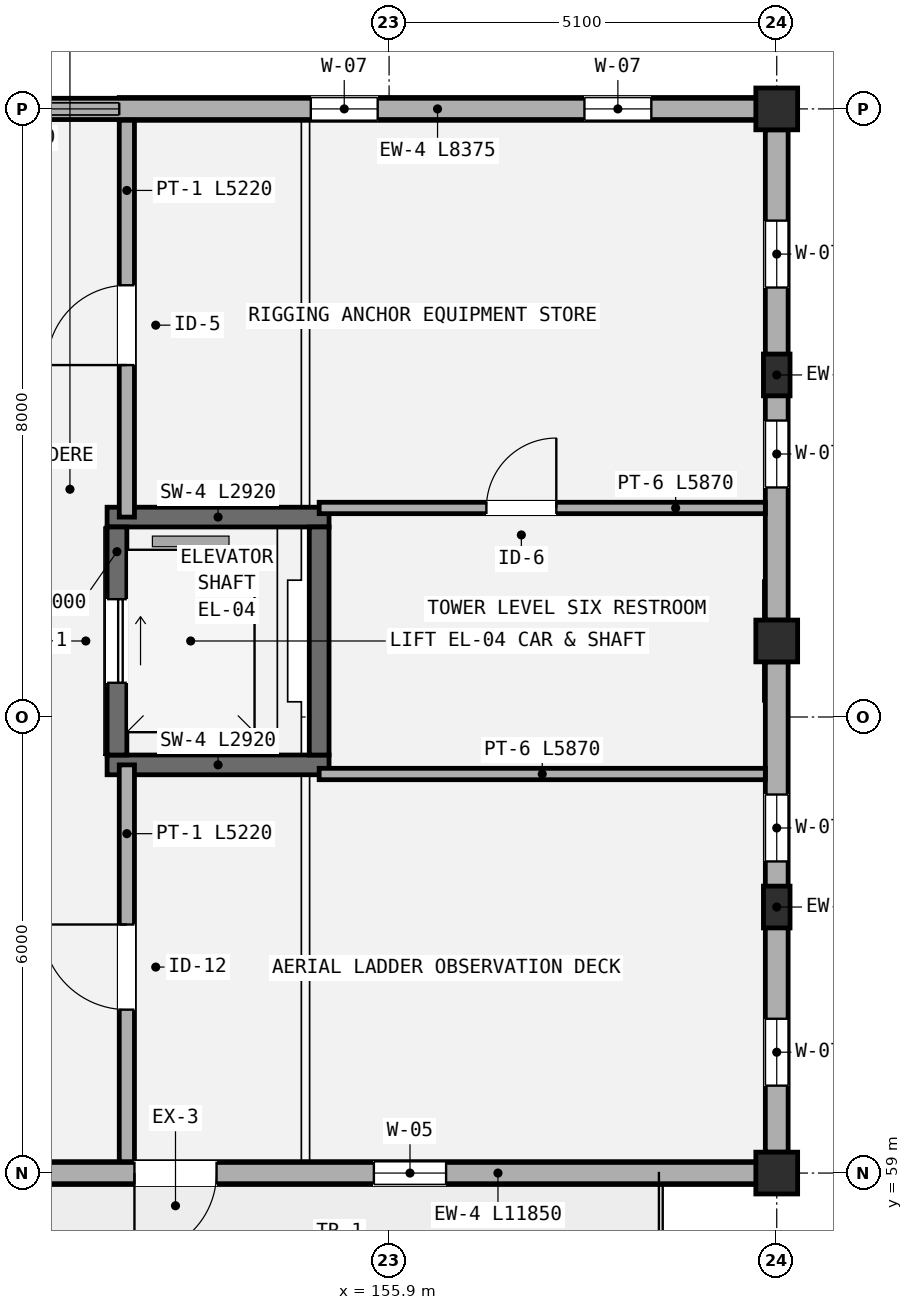
"""IFC4 building model, lengths in metres.
Left out: names, types, materials, properties, quantities, classifications, styles, units other than length and angle.
Written with IfcOpenShell. Run it as: python <this file> out.ifc"""

import sys

from ifc_helpers import new_model, si_unit, direction, frame, frame_2d, origin, origin_2d, place, context, subcontext, project, spatial, polyline, rectangle, outline, extrude, element, fill, save


model = new_model("IFC4")
c1 = context("Model", 3, precision=1e-05, world=origin(), true_north=direction((0.0, 1.0)))
c2 = subcontext(c1, "Body", "Model", "MODEL_VIEW")
j1 = project(units=[si_unit("LENGTHUNIT", "METRE"), si_unit("PLANEANGLEUNIT", "RADIAN")], contexts=[c1])
p1 = place(None, origin())
s1 = spatial("IfcSite", under=j1, at=p1, CompositionType="ELEMENT")
p2 = place(p1, origin())
s2 = spatial("IfcBuilding", under=s1, at=p2, CompositionType="ELEMENT")
p3 = place(p2, frame((0.0, 0.0, 22.05)))
s3 = spatial("IfcBuildingStorey", under=s2, at=p3, CompositionType="ELEMENT", Elevation=22.05)
for number, where, z_axis, x_axis in (
    (1, (161.0, 59.0, 0.0), (0.0, 0.0, 1.0), (1.0, 0.0, 0.0)),
    (2, (161.0, 66.0, 0.0), (0.0, 0.0, 1.0), (1.0, 0.0, 0.0)),
    (3, (161.0, 73.0, 0.0), (0.0, 0.0, 1.0), (1.0, 0.0, 0.0)),
):
    element("IfcColumn", number, at=place(p3, frame(where, z_axis=z_axis, x_axis=x_axis)), inside=s3, PredefinedType="COLUMN", context=c2, shape_type="SweptSolid", body=[
        extrude(rectangle(XDim=0.55, YDim=0.55, at=origin_2d()), origin(), (0.0, 0.0, 1.0), 4.05),
    ])
for number, where, z_axis, x_axis in (
    (4, (161.0, 62.5, 0.0), (0.0, 0.0, 1.0), (1.0, 0.0, 0.0)),
    (5, (161.0, 69.5, 0.0), (0.0, 0.0, 1.0), (1.0, 0.0, 0.0)),
):
    element("IfcColumn", number, at=place(p3, frame(where, z_axis=z_axis, x_axis=x_axis)), inside=s3, PredefinedType="PILASTER", context=c2, shape_type="SweptSolid", body=[
        extrude(rectangle(XDim=0.35, YDim=0.55, at=origin_2d()), origin(), (0.0, 0.0, 1.0), 4.05),
    ])
p4 = place(p3, frame((148.875, 59.0, 0.0), z_axis=(0.0, 0.0, 1.0), x_axis=(1.0, 0.0, 0.0)))
e6 = element("IfcWall", 6, at=p4, inside=s3, PredefinedType="STANDARD", context=c2, shape_type="SweptSolid", body=[
    extrude(rectangle(XDim=11.85, YDim=0.3, at=frame_2d((5.925, 0.0))), origin(), (0.0, 0.0, 1.0), 3.35),
])
p5 = place(p4, frame((3.675, 0.0, 0.0)))
e7 = element("IfcOpeningElement", 7, at=p5, cuts=e6, PredefinedType="OPENING", context=c2, shape_type="SweptSolid", body=[
    extrude(rectangle(XDim=1.08, YDim=2.1, at=frame_2d((0.54, 1.05))), frame((0.0, 0.16, 0.0), z_axis=(0.0, -1.0, 0.0), x_axis=(1.0, 0.0, 0.0)), (0.0, 0.0, 1.0), 0.32),
])
p6 = place(p4, frame((1.225, 0.0, 0.75)))
e8 = element("IfcOpeningElement", 8, at=p6, cuts=e6, PredefinedType="OPENING", context=c2, shape_type="SweptSolid", body=[
    extrude(rectangle(XDim=0.95, YDim=1.35, at=frame_2d((0.475, 0.675))), frame((0.0, 0.16, 0.0), z_axis=(0.0, -1.0, 0.0), x_axis=(1.0, 0.0, 0.0)), (0.0, 0.0, 1.0), 0.32),
])
p7 = place(p4, frame((6.825, 0.0, 0.75)))
e9 = element("IfcOpeningElement", 9, at=p7, cuts=e6, PredefinedType="OPENING", context=c2, shape_type="SweptSolid", body=[
    extrude(rectangle(XDim=0.95, YDim=1.35, at=frame_2d((0.475, 0.675))), frame((0.0, 0.16, 0.0), z_axis=(0.0, -1.0, 0.0), x_axis=(1.0, 0.0, 0.0)), (0.0, 0.0, 1.0), 0.32),
])
p8 = place(p3, frame((160.725, 73.0, 0.0), z_axis=(0.0, 0.0, 1.0), x_axis=(-1.0, 0.0, 0.0)))
e10 = element("IfcWall", 10, at=p8, inside=s3, PredefinedType="STANDARD", context=c2, shape_type="SweptSolid", body=[
    extrude(rectangle(XDim=8.375, YDim=0.3, at=frame_2d((4.188, 0.0))), origin(), (0.0, 0.0, 1.0), 3.35),
])
p9 = place(p8, frame((1.375, 0.0, 0.75)))
e11 = element("IfcOpeningElement", 11, at=p9, cuts=e10, PredefinedType="OPENING", context=c2, shape_type="SweptSolid", body=[
    extrude(rectangle(XDim=0.88, YDim=1.5, at=frame_2d((0.44, 0.75))), frame((0.0, 0.16, 0.0), z_axis=(0.0, -1.0, 0.0), x_axis=(1.0, 0.0, 0.0)), (0.0, 0.0, 1.0), 0.32),
])
p10 = place(p8, frame((4.975, 0.0, 0.75)))
e12 = element("IfcOpeningElement", 12, at=p10, cuts=e10, PredefinedType="OPENING", context=c2, shape_type="SweptSolid", body=[
    extrude(rectangle(XDim=0.88, YDim=1.5, at=frame_2d((0.44, 0.75))), frame((0.0, 0.16, 0.0), z_axis=(0.0, -1.0, 0.0), x_axis=(1.0, 0.0, 0.0)), (0.0, 0.0, 1.0), 0.32),
])
p11 = place(p3, frame((161.0, 59.275, 0.0), z_axis=(0.0, 0.0, 1.0), x_axis=(0.0, 1.0, 0.0)))
e13 = element("IfcWall", 13, at=p11, inside=s3, PredefinedType="STANDARD", context=c2, shape_type="SweptSolid", body=[
    extrude(rectangle(XDim=6.45, YDim=0.3, at=frame_2d((3.225, 0.0))), origin(), (0.0, 0.0, 1.0), 3.35),
])
p12 = place(p11, frame((0.875, 0.0, 0.75)))
e14 = element("IfcOpeningElement", 14, at=p12, cuts=e13, PredefinedType="OPENING", context=c2, shape_type="SweptSolid", body=[
    extrude(rectangle(XDim=0.88, YDim=1.5, at=frame_2d((0.44, 0.75))), frame((0.0, 0.16, 0.0), z_axis=(0.0, -1.0, 0.0), x_axis=(1.0, 0.0, 0.0)), (0.0, 0.0, 1.0), 0.32),
])
p13 = place(p11, frame((3.825, 0.0, 0.75)))
e15 = element("IfcOpeningElement", 15, at=p13, cuts=e13, PredefinedType="OPENING", context=c2, shape_type="SweptSolid", body=[
    extrude(rectangle(XDim=0.88, YDim=1.5, at=frame_2d((0.44, 0.75))), frame((0.0, 0.16, 0.0), z_axis=(0.0, -1.0, 0.0), x_axis=(1.0, 0.0, 0.0)), (0.0, 0.0, 1.0), 0.32),
])
p14 = place(p3, frame((161.0, 66.275, 0.0), z_axis=(0.0, 0.0, 1.0), x_axis=(0.0, 1.0, 0.0)))
e16 = element("IfcWall", 16, at=p14, inside=s3, PredefinedType="STANDARD", context=c2, shape_type="SweptSolid", body=[
    extrude(rectangle(XDim=6.45, YDim=0.3, at=frame_2d((3.225, 0.0))), origin(), (0.0, 0.0, 1.0), 3.35),
])
p15 = place(p14, frame((1.745, 0.0, 0.75)))
e17 = element("IfcOpeningElement", 17, at=p15, cuts=e16, PredefinedType="OPENING", context=c2, shape_type="SweptSolid", body=[
    extrude(rectangle(XDim=0.88, YDim=1.5, at=frame_2d((0.44, 0.75))), frame((0.0, 0.16, 0.0), z_axis=(0.0, -1.0, 0.0), x_axis=(1.0, 0.0, 0.0)), (0.0, 0.0, 1.0), 0.32),
])
p16 = place(p14, frame((4.375, 0.0, 0.75)))
e18 = element("IfcOpeningElement", 18, at=p16, cuts=e16, PredefinedType="OPENING", context=c2, shape_type="SweptSolid", body=[
    extrude(rectangle(XDim=0.88, YDim=1.5, at=frame_2d((0.44, 0.75))), frame((0.0, 0.16, 0.0), z_axis=(0.0, -1.0, 0.0), x_axis=(1.0, 0.0, 0.0)), (0.0, 0.0, 1.0), 0.32),
])
for number, where, z_axis, x_axis in (
    (19, (148.6, 59.0, 4.05), (0.0, 0.0, 1.0), (1.0, 0.0, 0.0)),
    (20, (148.6, 73.0, 4.05), (0.0, 0.0, 1.0), (1.0, 0.0, 0.0)),
):
    element("IfcWall", number, at=place(p3, frame(where, z_axis=z_axis, x_axis=x_axis)), inside=s3, PredefinedType="PARAPET", context=c2, shape_type="SweptSolid", body=[
        extrude(outline(polyline([(0.0, 0.0), (12.4, 0.0), (12.4, 0.8), (11.023, 0.8), (11.022, 0.987), (9.646, 0.987), (9.644, 1.175), (8.268, 1.175), (8.267, 1.362), (6.89, 1.362), (6.889, 1.55), (5.512, 1.55), (5.511, 1.362), (4.134, 1.362), (4.133, 1.175), (2.757, 1.175), (2.756, 0.987), (1.379, 0.987), (1.378, 0.8), (0.0, 0.8), (0.0, 0.0)])), frame((0.0, 0.14, 0.0), z_axis=(0.0, -1.0, 0.0), x_axis=(1.0, 0.0, 0.0)), (0.0, 0.0, 1.0), 0.28),
    ])
for number, where, z_axis, x_axis in (
    (21, (152.19, 64.37, 0.0), (0.0, 0.0, 1.0), (1.0, 0.0, 0.0)),
    (22, (155.11, 67.63, 0.0), (0.0, 0.0, 1.0), (-1.0, 0.0, 0.0)),
):
    element("IfcWall", number, at=place(p3, frame(where, z_axis=z_axis, x_axis=x_axis)), inside=s3, PredefinedType="SHEAR", context=c2, shape_type="SweptSolid", body=[
        extrude(rectangle(XDim=2.92, YDim=0.26, at=frame_2d((1.46, 0.0))), origin(), (0.0, 0.0, 1.0), 3.95),
    ])
p17 = place(p3, frame((152.32, 67.5, 0.0), z_axis=(0.0, 0.0, 1.0), x_axis=(0.0, -1.0, 0.0)))
e23 = element("IfcWall", 23, at=p17, inside=s3, PredefinedType="SHEAR", context=c2, shape_type="SweptSolid", body=[
    extrude(rectangle(XDim=3.0, YDim=0.26, at=frame_2d((1.5, 0.0))), origin(), (0.0, 0.0, 1.0), 3.95),
])
p18 = place(p17, frame((0.95, 0.0, 0.0)))
e24 = element("IfcOpeningElement", 24, at=p18, cuts=e23, PredefinedType="OPENING", context=c2, shape_type="SweptSolid", body=[
    extrude(rectangle(XDim=1.1, YDim=2.15, at=frame_2d((0.55, 1.075))), frame((0.0, 0.14, 0.0), z_axis=(0.0, -1.0, 0.0), x_axis=(1.0, 0.0, 0.0)), (0.0, 0.0, 1.0), 0.28),
])
p19 = place(p3, frame((154.98, 64.5, 0.0), z_axis=(0.0, 0.0, 1.0), x_axis=(0.0, 1.0, 0.0)))
e25 = element("IfcWall", 25, at=p19, inside=s3, PredefinedType="SHEAR", context=c2, shape_type="SweptSolid", body=[
    extrude(rectangle(XDim=3.0, YDim=0.26, at=frame_2d((1.5, 0.0))), origin(), (0.0, 0.0, 1.0), 3.95),
])
p20 = place(p3, frame((152.45, 59.15, 0.0), z_axis=(0.0, 0.0, 1.0), x_axis=(0.0, 1.0, 0.0)))
e26 = element("IfcWall", 26, at=p20, inside=s3, PredefinedType="PARTITIONING", context=c2, shape_type="SweptSolid", body=[
    extrude(rectangle(XDim=5.22, YDim=0.2, at=frame_2d((2.61, 0.0))), origin(), (0.0, 0.0, 1.0), 3.3),
])
p21 = place(p20, frame((2.0, 0.0, 0.0)))
e27 = element("IfcOpeningElement", 27, at=p21, cuts=e26, PredefinedType="OPENING", context=c2, shape_type="SweptSolid", body=[
    extrude(rectangle(XDim=1.12, YDim=2.15, at=frame_2d((0.56, 1.075))), frame((0.0, 0.11, 0.0), z_axis=(0.0, -1.0, 0.0), x_axis=(1.0, 0.0, 0.0)), (0.0, 0.0, 1.0), 0.22),
])
p22 = place(p3, frame((152.45, 67.63, 0.0), z_axis=(0.0, 0.0, 1.0), x_axis=(0.0, 1.0, 0.0)))
e28 = element("IfcWall", 28, at=p22, inside=s3, PredefinedType="PARTITIONING", context=c2, shape_type="SweptSolid", body=[
    extrude(rectangle(XDim=5.22, YDim=0.2, at=frame_2d((2.61, 0.0))), origin(), (0.0, 0.0, 1.0), 3.3),
])
p23 = place(p22, frame((2.0, 0.0, 0.0)))
e29 = element("IfcOpeningElement", 29, at=p23, cuts=e28, PredefinedType="OPENING", context=c2, shape_type="SweptSolid", body=[
    extrude(rectangle(XDim=1.05, YDim=2.14, at=frame_2d((0.525, 1.07))), frame((0.0, 0.11, 0.0), z_axis=(0.0, -1.0, 0.0), x_axis=(1.0, 0.0, 0.0)), (0.0, 0.0, 1.0), 0.22),
])
p24 = place(p3, frame((154.98, 64.25, 0.0), z_axis=(0.0, 0.0, 1.0), x_axis=(1.0, 0.0, 0.0)))
e30 = element("IfcWall", 30, at=p24, inside=s3, PredefinedType="PARTITIONING", context=c2, shape_type="SweptSolid", body=[
    extrude(rectangle(XDim=5.87, YDim=0.15, at=frame_2d((2.935, 0.0))), origin(), (0.0, 0.0, 1.0), 3.3),
])
p25 = place(p3, frame((154.98, 67.75, 0.0), z_axis=(0.0, 0.0, 1.0), x_axis=(1.0, 0.0, 0.0)))
e31 = element("IfcWall", 31, at=p25, inside=s3, PredefinedType="PARTITIONING", context=c2, shape_type="SweptSolid", body=[
    extrude(rectangle(XDim=5.87, YDim=0.15, at=frame_2d((2.935, 0.0))), origin(), (0.0, 0.0, 1.0), 3.3),
])
p26 = place(p25, frame((2.2, 0.0, 0.0)))
e32 = element("IfcOpeningElement", 32, at=p26, cuts=e31, PredefinedType="OPENING", context=c2, shape_type="SweptSolid", body=[
    extrude(rectangle(XDim=0.92, YDim=2.1, at=frame_2d((0.46, 1.05))), frame((0.0, 0.085, 0.0), z_axis=(0.0, -1.0, 0.0), x_axis=(1.0, 0.0, 0.0)), (0.0, 0.0, 1.0), 0.17),
])
p27 = place(p5, frame((1.08, 0.0, 0.0), z_axis=(0.0, 0.0, 1.0), x_axis=(-1.0, 0.0, 0.0)))
e33 = element("IfcDoor", 33, at=p27, inside=s3, OperationType="SINGLE_SWING_LEFT", PredefinedType="DOOR", context=c2, shape_type="SweptSolid", body=[
    extrude(rectangle(XDim=1.08, YDim=2.1, at=frame_2d((0.54, 1.05))), frame((0.0, 0.025, 0.0), z_axis=(0.0, -1.0, 0.0), x_axis=(1.0, 0.0, 0.0)), (0.0, 0.0, 1.0), 0.05),
])
fill(e7, e33)
p28 = place(p7, origin())
e34 = element("IfcWindow", 34, at=p28, inside=s3, PartitioningType="SINGLE_PANEL", PredefinedType="WINDOW", context=c2, shape_type="SweptSolid", body=[
    extrude(rectangle(XDim=0.95, YDim=1.35, at=frame_2d((0.475, 0.675))), frame((0.0, 0.03, 0.0), z_axis=(0.0, -1.0, 0.0), x_axis=(1.0, 0.0, 0.0)), (0.0, 0.0, 1.0), 0.06),
])
fill(e9, e34)
p29 = place(p9, origin())
e35 = element("IfcWindow", 35, at=p29, inside=s3, PartitioningType="SINGLE_PANEL", PredefinedType="WINDOW", context=c2, shape_type="SweptSolid", body=[
    extrude(rectangle(XDim=0.88, YDim=1.5, at=frame_2d((0.44, 0.75))), frame((0.0, 0.03, 0.0), z_axis=(0.0, -1.0, 0.0), x_axis=(1.0, 0.0, 0.0)), (0.0, 0.0, 1.0), 0.06),
])
fill(e11, e35)
p30 = place(p10, origin())
e36 = element("IfcWindow", 36, at=p30, inside=s3, PartitioningType="SINGLE_PANEL", PredefinedType="WINDOW", context=c2, shape_type="SweptSolid", body=[
    extrude(rectangle(XDim=0.88, YDim=1.5, at=frame_2d((0.44, 0.75))), frame((0.0, 0.03, 0.0), z_axis=(0.0, -1.0, 0.0), x_axis=(1.0, 0.0, 0.0)), (0.0, 0.0, 1.0), 0.06),
])
fill(e12, e36)
p31 = place(p12, origin())
e37 = element("IfcWindow", 37, at=p31, inside=s3, PartitioningType="SINGLE_PANEL", PredefinedType="WINDOW", context=c2, shape_type="SweptSolid", body=[
    extrude(rectangle(XDim=0.88, YDim=1.5, at=frame_2d((0.44, 0.75))), frame((0.0, 0.03, 0.0), z_axis=(0.0, -1.0, 0.0), x_axis=(1.0, 0.0, 0.0)), (0.0, 0.0, 1.0), 0.06),
])
fill(e14, e37)
p32 = place(p13, origin())
e38 = element("IfcWindow", 38, at=p32, inside=s3, PartitioningType="SINGLE_PANEL", PredefinedType="WINDOW", context=c2, shape_type="SweptSolid", body=[
    extrude(rectangle(XDim=0.88, YDim=1.5, at=frame_2d((0.44, 0.75))), frame((0.0, 0.03, 0.0), z_axis=(0.0, -1.0, 0.0), x_axis=(1.0, 0.0, 0.0)), (0.0, 0.0, 1.0), 0.06),
])
fill(e15, e38)
p33 = place(p15, origin())
e39 = element("IfcWindow", 39, at=p33, inside=s3, PartitioningType="SINGLE_PANEL", PredefinedType="WINDOW", context=c2, shape_type="SweptSolid", body=[
    extrude(rectangle(XDim=0.88, YDim=1.5, at=frame_2d((0.44, 0.75))), frame((0.0, 0.03, 0.0), z_axis=(0.0, -1.0, 0.0), x_axis=(1.0, 0.0, 0.0)), (0.0, 0.0, 1.0), 0.06),
])
fill(e17, e39)
p34 = place(p16, origin())
e40 = element("IfcWindow", 40, at=p34, inside=s3, PartitioningType="SINGLE_PANEL", PredefinedType="WINDOW", context=c2, shape_type="SweptSolid", body=[
    extrude(rectangle(XDim=0.88, YDim=1.5, at=frame_2d((0.44, 0.75))), frame((0.0, 0.03, 0.0), z_axis=(0.0, -1.0, 0.0), x_axis=(1.0, 0.0, 0.0)), (0.0, 0.0, 1.0), 0.06),
])
fill(e18, e40)
p35 = place(p18, origin())
e41 = element("IfcDoor", 41, at=p35, inside=s3, OperationType="SLIDING_TO_LEFT", PredefinedType="DOOR", context=c2, shape_type="SweptSolid", body=[
    extrude(rectangle(XDim=1.1, YDim=2.15, at=frame_2d((0.55, 1.075))), frame((0.0, 0.025, 0.0), z_axis=(0.0, -1.0, 0.0), x_axis=(1.0, 0.0, 0.0)), (0.0, 0.0, 1.0), 0.05),
])
fill(e24, e41)
p36 = place(p21, origin())
e42 = element("IfcDoor", 42, at=p36, inside=s3, OperationType="SINGLE_SWING_RIGHT", PredefinedType="DOOR", context=c2, shape_type="SweptSolid", body=[
    extrude(rectangle(XDim=1.12, YDim=2.15, at=frame_2d((0.56, 1.075))), frame((0.0, 0.025, 0.0), z_axis=(0.0, -1.0, 0.0), x_axis=(1.0, 0.0, 0.0)), (0.0, 0.0, 1.0), 0.05),
])
fill(e27, e42)
p37 = place(p23, origin())
e43 = element("IfcDoor", 43, at=p37, inside=s3, OperationType="SINGLE_SWING_LEFT", PredefinedType="DOOR", context=c2, shape_type="SweptSolid", body=[
    extrude(rectangle(XDim=1.05, YDim=2.14, at=frame_2d((0.525, 1.07))), frame((0.0, 0.025, 0.0), z_axis=(0.0, -1.0, 0.0), x_axis=(1.0, 0.0, 0.0)), (0.0, 0.0, 1.0), 0.05),
])
fill(e29, e43)
p38 = place(p26, origin())
e44 = element("IfcDoor", 44, at=p38, inside=s3, OperationType="SINGLE_SWING_RIGHT", PredefinedType="DOOR", context=c2, shape_type="SweptSolid", body=[
    extrude(rectangle(XDim=0.92, YDim=2.1, at=frame_2d((0.46, 1.05))), frame((0.0, 0.025, 0.0), z_axis=(0.0, -1.0, 0.0), x_axis=(1.0, 0.0, 0.0)), (0.0, 0.0, 1.0), 0.05),
])
fill(e32, e44)
save(model, sys.argv[1])
